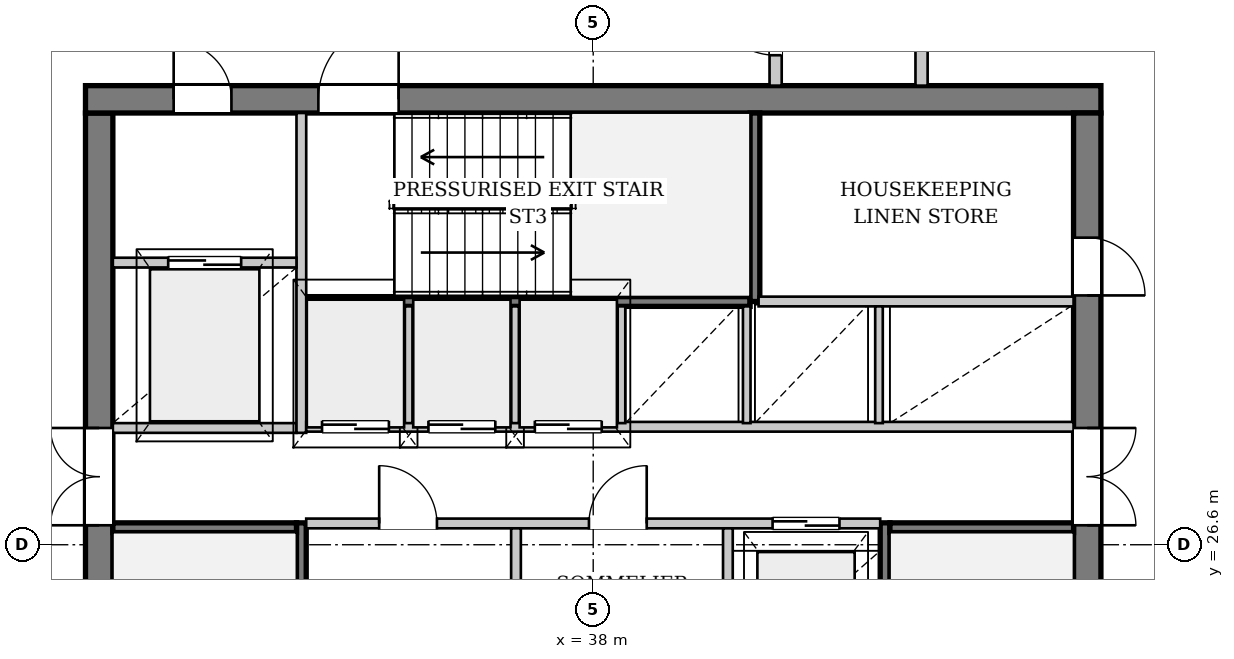
"""IFC4 building model, lengths in metres.
Left out: names, types, materials, properties, quantities, classifications, styles, units other than length and angle.
Written with IfcOpenShell. Run it as: python <this file> out.ifc"""

import sys

from ifc_helpers import new_model, si_unit, direction, frame, frame_2d, origin, place, context, subcontext, project, spatial, rectangle, extrude, source, transform, mapped, element, fill, save


model = new_model("IFC4")
c1 = context("Model", 3, precision=1e-05, world=origin(), true_north=direction((0.0, 1.0)))
c2 = subcontext(c1, "Body", "Model", "MODEL_VIEW")
j1 = project(units=[si_unit("LENGTHUNIT", "METRE"), si_unit("PLANEANGLEUNIT", "RADIAN")], contexts=[c1])
p1 = place(None, origin())
s1 = spatial("IfcSite", under=j1, at=p1, CompositionType="ELEMENT")
p2 = place(p1, origin())
s2 = spatial("IfcBuilding", under=s1, at=p2, CompositionType="ELEMENT")
p3 = place(p2, frame((0.0, 0.0, 270.5)))
s3 = spatial("IfcBuildingStorey", under=s2, at=p3, CompositionType="ELEMENT", Elevation=270.5)
p4 = place(p3, frame((51.28, 27.266, 0.0), z_axis=(0.0, 0.0, 1.0), x_axis=(-0.218426207381, -0.975853468472, 0.0)))
e1 = element("IfcWall", 1, at=p4, inside=s3, PredefinedType="SOLIDWALL", context=c2, shape_type="SweptSolid", body=[
    extrude(rectangle(XDim=22.187, YDim=0.32, at=frame_2d((11.093, 0.0))), origin(), (0.0, 0.0, 1.0), 2.872),
])
p5 = place(p4, frame((6.35, 0.0, 0.0)))
e2 = element("IfcOpeningElement", 2, at=p5, cuts=e1, PredefinedType="OPENING", context=c2, shape_type="SweptSolid", body=[
    extrude(rectangle(XDim=1.5, YDim=2.3, at=frame_2d((0.75, 1.15))), frame((0.0, 0.17, 0.0), z_axis=(0.0, -1.0, 0.0), x_axis=(1.0, 0.0, 0.0)), (0.0, 0.0, 1.0), 0.34),
])
p6 = place(p4, frame((15.568, 0.0, 0.402)))
e3 = element("IfcOpeningElement", 3, at=p6, cuts=e1, PredefinedType="OPENING", context=c2, shape_type="SweptSolid", body=[
    extrude(rectangle(XDim=2.6, YDim=2.35, at=frame_2d((1.3, 1.175))), frame((0.0, 0.17, 0.0), z_axis=(0.0, -1.0, 0.0), x_axis=(1.0, 0.0, 0.0)), (0.0, 0.0, 1.0), 0.34),
])
p7 = place(p3, frame((16.066, 25.875, 0.0), z_axis=(0.0, 0.0, 1.0), x_axis=(0.785693730349, 0.61861568206, 0.0)))
e4 = element("IfcWall", 4, at=p7, inside=s3, PredefinedType="SOLIDWALL", context=c2, shape_type="SweptSolid", body=[
    extrude(rectangle(XDim=21.675, YDim=0.38, at=frame_2d((10.837, 0.0))), origin(), (0.0, 0.0, 1.0), 2.872),
])
p8 = place(p7, frame((4.969, 0.0, 0.502)))
e5 = element("IfcOpeningElement", 5, at=p8, cuts=e4, PredefinedType="OPENING", context=c2, shape_type="SweptSolid", body=[
    extrude(rectangle(XDim=2.2, YDim=2.25, at=frame_2d((1.1, 1.125))), frame((0.0, 0.2, 0.0), z_axis=(0.0, -1.0, 0.0), x_axis=(1.0, 0.0, 0.0)), (0.0, 0.0, 1.0), 0.4),
])
p9 = place(p7, frame((17.506, 0.0, 0.502)))
e6 = element("IfcOpeningElement", 6, at=p9, cuts=e4, PredefinedType="OPENING", context=c2, shape_type="SweptSolid", body=[
    extrude(rectangle(XDim=2.2, YDim=2.25, at=frame_2d((1.1, 1.125))), frame((0.0, 0.2, 0.0), z_axis=(0.0, -1.0, 0.0), x_axis=(1.0, 0.0, 0.0)), (0.0, 0.0, 1.0), 0.4),
])
p10 = place(p3, frame((29.875, 19.5, 0.0), z_axis=(0.0, 0.0, 1.0), x_axis=(0.0, 1.0, 0.0)))
e7 = element("IfcWall", 7, at=p10, inside=s3, PredefinedType="SHEAR", context=c2, shape_type="SweptSolid", body=[
    extrude(rectangle(XDim=14.2, YDim=0.45, at=frame_2d((7.1, 0.0))), origin(), (0.0, 0.0, 1.0), 3.38),
])
p11 = place(p10, frame((7.42, 0.0, 0.0)))
e8 = element("IfcOpeningElement", 8, at=p11, cuts=e7, PredefinedType="OPENING", context=c2, shape_type="SweptSolid", body=[
    extrude(rectangle(XDim=1.6, YDim=2.2, at=frame_2d((0.8, 1.1))), frame((0.0, 0.235, 0.0), z_axis=(0.0, -1.0, 0.0), x_axis=(1.0, 0.0, 0.0)), (0.0, 0.0, 1.0), 0.47),
])
p12 = place(p3, frame((29.65, 33.925, 0.0), z_axis=(0.0, 0.0, 1.0), x_axis=(1.0, 0.0, 0.0)))
e9 = element("IfcWall", 9, at=p12, inside=s3, PredefinedType="SHEAR", context=c2, shape_type="SweptSolid", body=[
    extrude(rectangle(XDim=16.7, YDim=0.45, at=frame_2d((8.35, 0.0))), origin(), (0.0, 0.0, 1.0), 3.38),
])
p13 = place(p12, frame((1.45, 0.0, 0.0)))
e10 = element("IfcOpeningElement", 10, at=p13, cuts=e9, PredefinedType="OPENING", context=c2, shape_type="SweptSolid", body=[
    extrude(rectangle(XDim=0.95, YDim=2.1, at=frame_2d((0.475, 1.05))), frame((0.0, 0.235, 0.0), z_axis=(0.0, -1.0, 0.0), x_axis=(1.0, 0.0, 0.0)), (0.0, 0.0, 1.0), 0.47),
])
p14 = place(p12, frame((3.83, 0.0, 0.0)))
e11 = element("IfcOpeningElement", 11, at=p14, cuts=e9, PredefinedType="OPENING", context=c2, shape_type="SweptSolid", body=[
    extrude(rectangle(XDim=1.32, YDim=2.2, at=frame_2d((0.66, 1.1))), frame((0.0, 0.235, 0.0), z_axis=(0.0, -1.0, 0.0), x_axis=(1.0, 0.0, 0.0)), (0.0, 0.0, 1.0), 0.47),
])
p15 = place(p3, frame((46.125, 33.7, 0.0), z_axis=(0.0, 0.0, 1.0), x_axis=(0.0, -1.0, 0.0)))
e12 = element("IfcWall", 12, at=p15, inside=s3, PredefinedType="SHEAR", context=c2, shape_type="SweptSolid", body=[
    extrude(rectangle(XDim=14.2, YDim=0.45, at=frame_2d((7.1, 0.0))), origin(), (0.0, 0.0, 1.0), 3.38),
])
p16 = place(p15, frame((5.18, 0.0, 0.0)))
e13 = element("IfcOpeningElement", 13, at=p16, cuts=e12, PredefinedType="OPENING", context=c2, shape_type="SweptSolid", body=[
    extrude(rectangle(XDim=1.6, YDim=2.2, at=frame_2d((0.8, 1.1))), frame((0.0, 0.235, 0.0), z_axis=(0.0, -1.0, 0.0), x_axis=(1.0, 0.0, 0.0)), (0.0, 0.0, 1.0), 0.47),
])
p17 = place(p15, frame((2.05, 0.0, 0.0)))
e14 = element("IfcOpeningElement", 14, at=p17, cuts=e12, PredefinedType="OPENING", context=c2, shape_type="SweptSolid", body=[
    extrude(rectangle(XDim=0.95, YDim=2.1, at=frame_2d((0.475, 1.05))), frame((0.0, 0.235, 0.0), z_axis=(0.0, -1.0, 0.0), x_axis=(1.0, 0.0, 0.0)), (0.0, 0.0, 1.0), 0.47),
])
p18 = place(p3, frame((33.2, 19.5, 0.0), z_axis=(0.0, 0.0, 1.0), x_axis=(0.0, 1.0, 0.0)))
e15 = element("IfcWall", 15, at=p18, inside=s3, PredefinedType="PARTITIONING", context=c2, shape_type="SweptSolid", body=[
    extrude(rectangle(XDim=7.46, YDim=0.16, at=frame_2d((3.73, 0.0))), origin(), (0.0, 0.0, 1.0), 3.38),
])
p19 = place(p18, frame((0.08, 0.0, 0.0)))
e16 = element("IfcOpeningElement", 16, at=p19, cuts=e15, PredefinedType="OPENING", context=c2, shape_type="SweptSolid", body=[
    extrude(rectangle(XDim=1.32, YDim=2.2, at=frame_2d((0.66, 1.1))), frame((0.0, 0.09, 0.0), z_axis=(0.0, -1.0, 0.0), x_axis=(1.0, 0.0, 0.0)), (0.0, 0.0, 1.0), 0.18),
])
p20 = place(p3, frame((30.1, 26.88, 0.0), z_axis=(0.0, 0.0, 1.0), x_axis=(1.0, 0.0, 0.0)))
e17 = element("IfcWall", 17, at=p20, inside=s3, PredefinedType="PARTITIONING", context=c2, shape_type="SweptSolid", body=[
    extrude(rectangle(XDim=3.02, YDim=0.16, at=frame_2d((1.51, 0.0))), origin(), (0.0, 0.0, 1.0), 3.38),
])
p21 = place(p3, frame((42.8, 26.96, 0.0), z_axis=(0.0, 0.0, 1.0), x_axis=(0.0, -1.0, 0.0)))
e18 = element("IfcWall", 18, at=p21, inside=s3, PredefinedType="PARTITIONING", context=c2, shape_type="SweptSolid", body=[
    extrude(rectangle(XDim=7.46, YDim=0.16, at=frame_2d((3.73, 0.0))), origin(), (0.0, 0.0, 1.0), 3.38),
])
p22 = place(p21, frame((6.06, 0.0, 0.0)))
e19 = element("IfcOpeningElement", 19, at=p22, cuts=e18, PredefinedType="OPENING", context=c2, shape_type="SweptSolid", body=[
    extrude(rectangle(XDim=1.32, YDim=2.2, at=frame_2d((0.66, 1.1))), frame((0.0, 0.09, 0.0), z_axis=(0.0, -1.0, 0.0), x_axis=(1.0, 0.0, 0.0)), (0.0, 0.0, 1.0), 0.18),
])
p23 = place(p3, frame((42.88, 26.88, 0.0), z_axis=(0.0, 0.0, 1.0), x_axis=(1.0, 0.0, 0.0)))
e20 = element("IfcWall", 20, at=p23, inside=s3, PredefinedType="PARTITIONING", context=c2, shape_type="SweptSolid", body=[
    extrude(rectangle(XDim=3.02, YDim=0.16, at=frame_2d((1.51, 0.0))), origin(), (0.0, 0.0, 1.0), 3.38),
])
p24 = place(p3, frame((33.28, 30.6, 0.0), z_axis=(0.0, 0.0, 1.0), x_axis=(1.0, 0.0, 0.0)))
e21 = element("IfcWall", 21, at=p24, inside=s3, PredefinedType="PARTITIONING", context=c2, shape_type="SweptSolid", body=[
    extrude(rectangle(XDim=7.3, YDim=0.16, at=frame_2d((3.65, 0.0))), origin(), (0.0, 0.0, 1.0), 3.38),
])
p25 = place(p3, frame((40.66, 30.6, 0.0), z_axis=(0.0, 0.0, 1.0), x_axis=(0.0, 1.0, 0.0)))
e22 = element("IfcWall", 22, at=p25, inside=s3, PredefinedType="PARTITIONING", context=c2, shape_type="SweptSolid", body=[
    extrude(rectangle(XDim=3.1, YDim=0.16, at=frame_2d((1.55, 0.0))), origin(), (0.0, 0.0, 1.0), 3.38),
])
p26 = place(p3, frame((30.1, 28.52, 0.0), z_axis=(0.0, 0.0, 1.0), x_axis=(1.0, 0.0, 0.0)))
e23 = element("IfcWall", 23, at=p26, inside=s3, PredefinedType="PARTITIONING", context=c2, shape_type="SweptSolid", body=[
    extrude(rectangle(XDim=3.02, YDim=0.16, at=frame_2d((1.51, 0.0))), origin(), (0.0, 0.0, 1.0), 3.38),
])
p27 = place(p3, frame((33.2, 28.44, 0.0), z_axis=(0.0, 0.0, 1.0), x_axis=(0.0, 1.0, 0.0)))
e24 = element("IfcWall", 24, at=p27, inside=s3, PredefinedType="PARTITIONING", context=c2, shape_type="SweptSolid", body=[
    extrude(rectangle(XDim=5.26, YDim=0.16, at=frame_2d((2.63, 0.0))), origin(), (0.0, 0.0, 1.0), 3.38),
])
p28 = place(p3, frame((30.1, 31.24, 0.0), z_axis=(0.0, 0.0, 1.0), x_axis=(1.0, 0.0, 0.0)))
e25 = element("IfcWall", 25, at=p28, inside=s3, PredefinedType="PARTITIONING", context=c2, shape_type="SweptSolid", body=[
    extrude(rectangle(XDim=3.02, YDim=0.16, at=frame_2d((1.51, 0.0))), origin(), (0.0, 0.0, 1.0), 3.38),
])
p29 = place(p28, frame((0.91, 0.0, 0.0)))
e26 = element("IfcOpeningElement", 26, at=p29, cuts=e25, PredefinedType="OPENING", context=c2, shape_type="SweptSolid", body=[
    extrude(rectangle(XDim=1.2, YDim=2.2, at=frame_2d((0.6, 1.1))), frame((0.0, 0.09, 0.0), z_axis=(0.0, -1.0, 0.0), x_axis=(1.0, 0.0, 0.0)), (0.0, 0.0, 1.0), 0.18),
])
p30 = place(p3, frame((33.28, 26.95, 0.0), z_axis=(0.0, 0.0, 1.0), x_axis=(1.0, 0.0, 0.0)))
e27 = element("IfcWall", 27, at=p30, inside=s3, PredefinedType="PARTITIONING", context=c2, shape_type="SweptSolid", body=[
    extrude(rectangle(XDim=9.44, YDim=0.16, at=frame_2d((4.72, 0.0))), origin(), (0.0, 0.0, 1.0), 3.38),
])
p31 = place(p30, frame((1.2, 0.0, 0.0)))
e28 = element("IfcOpeningElement", 28, at=p31, cuts=e27, PredefinedType="OPENING", context=c2, shape_type="SweptSolid", body=[
    extrude(rectangle(XDim=0.95, YDim=2.1, at=frame_2d((0.475, 1.05))), frame((0.0, 0.09, 0.0), z_axis=(0.0, -1.0, 0.0), x_axis=(1.0, 0.0, 0.0)), (0.0, 0.0, 1.0), 0.18),
])
p32 = place(p30, frame((4.65, 0.0, 0.0)))
e29 = element("IfcOpeningElement", 29, at=p32, cuts=e27, PredefinedType="OPENING", context=c2, shape_type="SweptSolid", body=[
    extrude(rectangle(XDim=0.95, YDim=2.1, at=frame_2d((0.475, 1.05))), frame((0.0, 0.09, 0.0), z_axis=(0.0, -1.0, 0.0), x_axis=(1.0, 0.0, 0.0)), (0.0, 0.0, 1.0), 0.18),
])
p33 = place(p30, frame((7.67, 0.0, 0.0)))
e30 = element("IfcOpeningElement", 30, at=p33, cuts=e27, PredefinedType="OPENING", context=c2, shape_type="SweptSolid", body=[
    extrude(rectangle(XDim=1.1, YDim=2.2, at=frame_2d((0.55, 1.1))), frame((0.0, 0.09, 0.0), z_axis=(0.0, -1.0, 0.0), x_axis=(1.0, 0.0, 0.0)), (0.0, 0.0, 1.0), 0.18),
])
for number, where, z_axis, x_axis in (
    (31, (36.73, 24.56, 0.0), (0.0, 0.0, 1.0), (0.0, 1.0, 0.0)),
    (32, (40.215, 24.56, 0.0), (0.0, 0.0, 1.0), (0.0, 1.0, 0.0)),
):
    element("IfcWall", number, at=place(p3, frame(where, z_axis=z_axis, x_axis=x_axis)), inside=s3, PredefinedType="PARTITIONING", context=c2, shape_type="SweptSolid", body=[
        extrude(rectangle(XDim=2.31, YDim=0.16, at=frame_2d((1.155, 0.0))), origin(), (0.0, 0.0, 1.0), 3.38),
    ])
p34 = place(p3, frame((33.28, 28.54, 0.0), z_axis=(0.0, 0.0, 1.0), x_axis=(1.0, 0.0, 0.0)))
e33 = element("IfcWall", 33, at=p34, inside=s3, PredefinedType="PARTITIONING", context=c2, shape_type="SweptSolid", body=[
    extrude(rectangle(XDim=12.62, YDim=0.16, at=frame_2d((6.31, 0.0))), origin(), (0.0, 0.0, 1.0), 3.38),
])
p35 = place(p34, frame((0.26, 0.0, 0.0)))
e34 = element("IfcOpeningElement", 34, at=p35, cuts=e33, PredefinedType="OPENING", context=c2, shape_type="SweptSolid", body=[
    extrude(rectangle(XDim=1.1, YDim=2.2, at=frame_2d((0.55, 1.1))), frame((0.0, 0.09, 0.0), z_axis=(0.0, -1.0, 0.0), x_axis=(1.0, 0.0, 0.0)), (0.0, 0.0, 1.0), 0.18),
])
p36 = place(p34, frame((2.01, 0.0, 0.0)))
e35 = element("IfcOpeningElement", 35, at=p36, cuts=e33, PredefinedType="OPENING", context=c2, shape_type="SweptSolid", body=[
    extrude(rectangle(XDim=1.1, YDim=2.2, at=frame_2d((0.55, 1.1))), frame((0.0, 0.09, 0.0), z_axis=(0.0, -1.0, 0.0), x_axis=(1.0, 0.0, 0.0)), (0.0, 0.0, 1.0), 0.18),
])
p37 = place(p34, frame((3.76, 0.0, 0.0)))
e36 = element("IfcOpeningElement", 36, at=p37, cuts=e33, PredefinedType="OPENING", context=c2, shape_type="SweptSolid", body=[
    extrude(rectangle(XDim=1.1, YDim=2.2, at=frame_2d((0.55, 1.1))), frame((0.0, 0.09, 0.0), z_axis=(0.0, -1.0, 0.0), x_axis=(1.0, 0.0, 0.0)), (0.0, 0.0, 1.0), 0.18),
])
p38 = place(p3, frame((40.72, 30.6, 0.0), z_axis=(0.0, 0.0, 1.0), x_axis=(1.0, 0.0, 0.0)))
e37 = element("IfcWall", 37, at=p38, inside=s3, PredefinedType="PARTITIONING", context=c2, shape_type="SweptSolid", body=[
    extrude(rectangle(XDim=5.18, YDim=0.16, at=frame_2d((2.59, 0.0))), origin(), (0.0, 0.0, 1.0), 3.38),
])
for number, where, z_axis, x_axis in (
    (38, (34.965, 28.6, 0.0), (0.0, 0.0, 1.0), (0.0, 1.0, 0.0)),
    (39, (36.715, 28.6, 0.0), (0.0, 0.0, 1.0), (0.0, 1.0, 0.0)),
    (40, (38.465, 28.6, 0.0), (0.0, 0.0, 1.0), (0.0, 1.0, 0.0)),
    (41, (40.525, 28.6, 0.0), (0.0, 0.0, 1.0), (0.0, 1.0, 0.0)),
    (42, (42.7, 28.6, 0.0), (0.0, 0.0, 1.0), (0.0, 1.0, 0.0)),
):
    element("IfcWall", number, at=place(p3, frame(where, z_axis=z_axis, x_axis=x_axis)), inside=s3, PredefinedType="PARTITIONING", context=c2, shape_type="SweptSolid", body=[
        extrude(rectangle(XDim=1.92, YDim=0.125, at=frame_2d((0.96, 0.0))), origin(), (0.0, 0.0, 1.0), 3.38),
    ])
p39 = place(p3, frame((41.0, 34.15, 0.0), z_axis=(0.0, 0.0, 1.0), x_axis=(0.0, 1.0, 0.0)))
e43 = element("IfcWall", 43, at=p39, inside=s3, PredefinedType="PARTITIONING", context=c2, shape_type="SweptSolid", body=[
    extrude(rectangle(XDim=1.85, YDim=0.2, at=frame_2d((0.925, 0.0))), origin(), (0.0, 0.0, 1.0), 3.38),
])
p40 = place(p39, frame((0.5, 0.0, 0.0)))
e44 = element("IfcOpeningElement", 44, at=p40, cuts=e43, PredefinedType="OPENING", context=c2, shape_type="SweptSolid", body=[
    extrude(rectangle(XDim=1.05, YDim=2.2, at=frame_2d((0.525, 1.1))), frame((0.0, 0.11, 0.0), z_axis=(0.0, -1.0, 0.0), x_axis=(1.0, 0.0, 0.0)), (0.0, 0.0, 1.0), 0.22),
])
p41 = place(p3, frame((43.4, 34.15, 0.0), z_axis=(0.0, 0.0, 1.0), x_axis=(0.0, 1.0, 0.0)))
e45 = element("IfcWall", 45, at=p41, inside=s3, PredefinedType="PARTITIONING", context=c2, shape_type="SweptSolid", body=[
    extrude(rectangle(XDim=1.85, YDim=0.2, at=frame_2d((0.925, 0.0))), origin(), (0.0, 0.0, 1.0), 3.055),
])
m1 = source(origin(), c2, "Body", "SweptSolid", [
    extrude(rectangle(XDim=1.6, YDim=2.2, at=frame_2d((0.8, 1.1))), frame((0.0, 0.025, 0.0), z_axis=(0.0, -1.0, 0.0), x_axis=(1.0, 0.0, 0.0)), (0.0, 0.0, 1.0), 0.05),
])
p42 = place(p11, origin())
e46 = element("IfcDoor", 46, at=p42, inside=s3, OperationType="DOUBLE_DOOR_SINGLE_SWING", PredefinedType="DOOR", context=c2, shape_type="MappedRepresentation", body=[
    mapped(m1, transform((0.0, 0.0, 0.0), x_axis=(1.0, 0.0, 0.0), y_axis=(0.0, 1.0, 0.0), z_axis=(0.0, 0.0, 1.0), scale=1.0)),
])
fill(e8, e46)
m2 = source(origin(), c2, "Body", "SweptSolid", [
    extrude(rectangle(XDim=0.95, YDim=2.1, at=frame_2d((0.475, 1.05))), frame((0.0, 0.025, 0.0), z_axis=(0.0, -1.0, 0.0), x_axis=(1.0, 0.0, 0.0)), (0.0, 0.0, 1.0), 0.05),
])
p43 = place(p13, origin())
e47 = element("IfcDoor", 47, at=p43, inside=s3, OperationType="SINGLE_SWING_LEFT", PredefinedType="DOOR", context=c2, shape_type="MappedRepresentation", body=[
    mapped(m2, transform((0.0, 0.0, 0.0), x_axis=(1.0, 0.0, 0.0), y_axis=(0.0, 1.0, 0.0), z_axis=(0.0, 0.0, 1.0), scale=1.0)),
])
fill(e10, e47)
m3 = source(origin(), c2, "Body", "SweptSolid", [
    extrude(rectangle(XDim=1.32, YDim=2.2, at=frame_2d((0.66, 1.1))), frame((0.0, 0.025, 0.0), z_axis=(0.0, -1.0, 0.0), x_axis=(1.0, 0.0, 0.0)), (0.0, 0.0, 1.0), 0.05),
])
p44 = place(p14, origin())
e48 = element("IfcDoor", 48, at=p44, inside=s3, OperationType="SINGLE_SWING_RIGHT", PredefinedType="DOOR", context=c2, shape_type="MappedRepresentation", body=[
    mapped(m3, transform((0.0, 0.0, 0.0), x_axis=(1.0, 0.0, 0.0), y_axis=(0.0, 1.0, 0.0), z_axis=(0.0, 0.0, 1.0), scale=1.0)),
])
fill(e11, e48)
p45 = place(p16, origin())
e49 = element("IfcDoor", 49, at=p45, inside=s3, OperationType="DOUBLE_DOOR_SINGLE_SWING", PredefinedType="DOOR", context=c2, shape_type="MappedRepresentation", body=[
    mapped(m1, transform((0.0, 0.0, 0.0), x_axis=(1.0, 0.0, 0.0), y_axis=(0.0, 1.0, 0.0), z_axis=(0.0, 0.0, 1.0), scale=1.0)),
])
fill(e13, e49)
m4 = source(origin(), c2, "Body", "SweptSolid", [
    extrude(rectangle(XDim=1.2, YDim=2.2, at=frame_2d((0.6, 1.1))), frame((0.0, 0.025, 0.0), z_axis=(0.0, -1.0, 0.0), x_axis=(1.0, 0.0, 0.0)), (0.0, 0.0, 1.0), 0.05),
])
p46 = place(p29, origin())
e50 = element("IfcDoor", 50, at=p46, inside=s3, OperationType="DOUBLE_DOOR_SLIDING", PredefinedType="DOOR", context=c2, shape_type="MappedRepresentation", body=[
    mapped(m4, transform((0.0, 0.0, 0.0), x_axis=(1.0, 0.0, 0.0), y_axis=(0.0, 1.0, 0.0), z_axis=(0.0, 0.0, 1.0), scale=1.0)),
])
fill(e26, e50)
p47 = place(p31, origin())
e51 = element("IfcDoor", 51, at=p47, inside=s3, OperationType="SINGLE_SWING_LEFT", PredefinedType="DOOR", context=c2, shape_type="MappedRepresentation", body=[
    mapped(m2, transform((0.0, 0.0, 0.0), x_axis=(1.0, 0.0, 0.0), y_axis=(0.0, 1.0, 0.0), z_axis=(0.0, 0.0, 1.0), scale=1.0)),
])
fill(e28, e51)
p48 = place(p32, origin())
e52 = element("IfcDoor", 52, at=p48, inside=s3, OperationType="SINGLE_SWING_RIGHT", PredefinedType="DOOR", context=c2, shape_type="MappedRepresentation", body=[
    mapped(m2, transform((0.0, 0.0, 0.0), x_axis=(1.0, 0.0, 0.0), y_axis=(0.0, 1.0, 0.0), z_axis=(0.0, 0.0, 1.0), scale=1.0)),
])
fill(e29, e52)
m5 = source(origin(), c2, "Body", "SweptSolid", [
    extrude(rectangle(XDim=1.1, YDim=2.2, at=frame_2d((0.55, 1.1))), frame((0.0, 0.025, 0.0), z_axis=(0.0, -1.0, 0.0), x_axis=(1.0, 0.0, 0.0)), (0.0, 0.0, 1.0), 0.05),
])
p49 = place(p33, origin())
e53 = element("IfcDoor", 53, at=p49, inside=s3, OperationType="DOUBLE_DOOR_SLIDING", PredefinedType="DOOR", context=c2, shape_type="MappedRepresentation", body=[
    mapped(m5, transform((0.0, 0.0, 0.0), x_axis=(1.0, 0.0, 0.0), y_axis=(0.0, 1.0, 0.0), z_axis=(0.0, 0.0, 1.0), scale=1.0)),
])
fill(e30, e53)
p50 = place(p35, origin())
e54 = element("IfcDoor", 54, at=p50, inside=s3, OperationType="DOUBLE_DOOR_SLIDING", PredefinedType="DOOR", context=c2, shape_type="MappedRepresentation", body=[
    mapped(m5, transform((0.0, 0.0, 0.0), x_axis=(1.0, 0.0, 0.0), y_axis=(0.0, 1.0, 0.0), z_axis=(0.0, 0.0, 1.0), scale=1.0)),
])
fill(e34, e54)
p51 = place(p36, origin())
e55 = element("IfcDoor", 55, at=p51, inside=s3, OperationType="DOUBLE_DOOR_SLIDING", PredefinedType="DOOR", context=c2, shape_type="MappedRepresentation", body=[
    mapped(m5, transform((0.0, 0.0, 0.0), x_axis=(1.0, 0.0, 0.0), y_axis=(0.0, 1.0, 0.0), z_axis=(0.0, 0.0, 1.0), scale=1.0)),
])
fill(e35, e55)
p52 = place(p37, origin())
e56 = element("IfcDoor", 56, at=p52, inside=s3, OperationType="DOUBLE_DOOR_SLIDING", PredefinedType="DOOR", context=c2, shape_type="MappedRepresentation", body=[
    mapped(m5, transform((0.0, 0.0, 0.0), x_axis=(1.0, 0.0, 0.0), y_axis=(0.0, 1.0, 0.0), z_axis=(0.0, 0.0, 1.0), scale=1.0)),
])
fill(e36, e56)
p53 = place(p17, origin())
e57 = element("IfcDoor", 57, at=p53, inside=s3, OperationType="SINGLE_SWING_RIGHT", PredefinedType="DOOR", context=c2, shape_type="MappedRepresentation", body=[
    mapped(m2, transform((0.0, 0.0, 0.0), x_axis=(1.0, 0.0, 0.0), y_axis=(0.0, 1.0, 0.0), z_axis=(0.0, 0.0, 1.0), scale=1.0)),
])
fill(e14, e57)
m6 = source(origin(), c2, "Body", "SweptSolid", [
    extrude(rectangle(XDim=1.05, YDim=2.2, at=frame_2d((0.525, 1.1))), frame((0.0, 0.025, 0.0), z_axis=(0.0, -1.0, 0.0), x_axis=(1.0, 0.0, 0.0)), (0.0, 0.0, 1.0), 0.05),
])
p54 = place(p40, origin())
e58 = element("IfcDoor", 58, at=p54, inside=s3, OperationType="SINGLE_SWING_RIGHT", PredefinedType="DOOR", context=c2, shape_type="MappedRepresentation", body=[
    mapped(m6, transform((0.0, 0.0, 0.0), x_axis=(1.0, 0.0, 0.0), y_axis=(0.0, 1.0, 0.0), z_axis=(0.0, 0.0, 1.0), scale=1.0)),
])
fill(e44, e58)
save(model, sys.argv[1])
